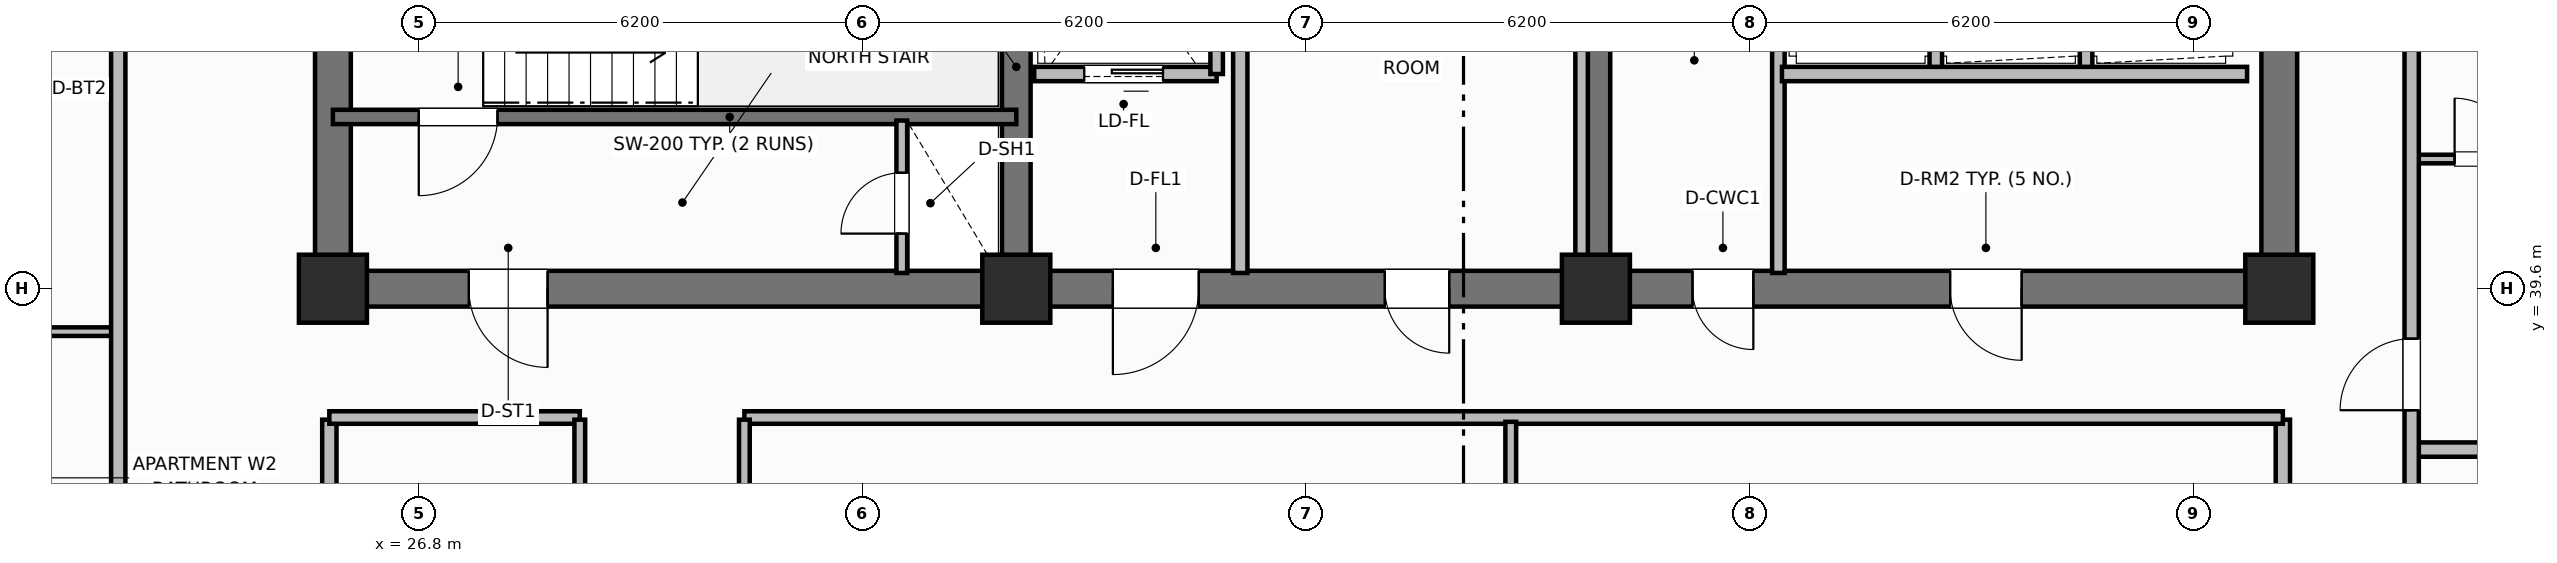
"""IFC4 building model, lengths in metres.
Left out: names, types, materials, properties, quantities, classifications, styles, units other than length and angle.
Written with IfcOpenShell. Run it as: python <this file> out.ifc"""

import sys

from ifc_helpers import new_model, si_unit, direction, frame, frame_2d, origin, origin_2d, place, context, subcontext, project, spatial, rectangle, extrude, element, fill, save


model = new_model("IFC4")
c1 = context("Model", 3, precision=1e-05, world=origin(), true_north=direction((0.0, 1.0)))
c2 = subcontext(c1, "Body", "Model", "MODEL_VIEW")
j1 = project(units=[si_unit("LENGTHUNIT", "METRE"), si_unit("PLANEANGLEUNIT", "RADIAN")], contexts=[c1])
p1 = place(None, origin())
s1 = spatial("IfcSite", under=j1, at=p1, CompositionType="ELEMENT")
p2 = place(p1, origin())
s2 = spatial("IfcBuilding", under=s1, at=p2, CompositionType="ELEMENT")
p3 = place(p2, frame((0.0, 0.0, 177.4)))
s3 = spatial("IfcBuildingStorey", under=s2, at=p3, CompositionType="ELEMENT", Elevation=177.4)
for number, where, z_axis, x_axis in (
    (1, (25.6, 39.85, 0.0), (0.0, 0.0, 1.0), (0.0, 1.0, 0.0)),
    (2, (52.8, 39.85, 0.0), (0.0, 0.0, 1.0), (0.0, 1.0, 0.0)),
):
    element("IfcWall", number, at=place(p3, frame(where, z_axis=z_axis, x_axis=x_axis)), inside=s3, PredefinedType="SHEAR", context=c2, shape_type="SweptSolid", body=[
        extrude(rectangle(XDim=5.7, YDim=0.5, at=frame_2d((2.85, 0.0))), origin(), (0.0, 0.0, 1.0), 3.7),
    ])
p4 = place(p3, frame((52.8, 39.6, 0.0), z_axis=(0.0, 0.0, 1.0), x_axis=(-1.0, 0.0, 0.0)))
e3 = element("IfcWall", 3, at=p4, inside=s3, PredefinedType="SHEAR", context=c2, shape_type="SweptSolid", body=[
    extrude(rectangle(XDim=27.2, YDim=0.5, at=frame_2d((13.6, 0.0))), origin(), (0.0, 0.0, 1.0), 3.7),
])
p5 = place(p4, frame((24.2, 0.0, 0.0)))
e4 = element("IfcOpeningElement", 4, at=p5, cuts=e3, PredefinedType="OPENING", context=c2, shape_type="SweptSolid", body=[
    extrude(rectangle(XDim=1.1, YDim=2.15, at=frame_2d((0.55, 1.075))), frame((0.0, 0.26, 0.0), z_axis=(0.0, -1.0, 0.0), x_axis=(1.0, 0.0, 0.0)), (0.0, 0.0, 1.0), 0.52),
])
p6 = place(p4, frame((15.1, 0.0, 0.0)))
e5 = element("IfcOpeningElement", 5, at=p6, cuts=e3, PredefinedType="OPENING", context=c2, shape_type="SweptSolid", body=[
    extrude(rectangle(XDim=1.2, YDim=2.15, at=frame_2d((0.6, 1.075))), frame((0.0, 0.26, 0.0), z_axis=(0.0, -1.0, 0.0), x_axis=(1.0, 0.0, 0.0)), (0.0, 0.0, 1.0), 0.52),
])
p7 = place(p4, frame((11.6, 0.0, 0.0)))
e6 = element("IfcOpeningElement", 6, at=p7, cuts=e3, PredefinedType="OPENING", context=c2, shape_type="SweptSolid", body=[
    extrude(rectangle(XDim=0.9, YDim=2.1, at=frame_2d((0.45, 1.05))), frame((0.0, 0.26, 0.0), z_axis=(0.0, -1.0, 0.0), x_axis=(1.0, 0.0, 0.0)), (0.0, 0.0, 1.0), 0.52),
])
p8 = place(p4, frame((7.35, 0.0, 0.0)))
e7 = element("IfcOpeningElement", 7, at=p8, cuts=e3, PredefinedType="OPENING", context=c2, shape_type="SweptSolid", body=[
    extrude(rectangle(XDim=0.85, YDim=2.1, at=frame_2d((0.425, 1.05))), frame((0.0, 0.26, 0.0), z_axis=(0.0, -1.0, 0.0), x_axis=(1.0, 0.0, 0.0)), (0.0, 0.0, 1.0), 0.52),
])
p9 = place(p4, frame((3.6, 0.0, 0.0)))
e8 = element("IfcOpeningElement", 8, at=p9, cuts=e3, PredefinedType="OPENING", context=c2, shape_type="SweptSolid", body=[
    extrude(rectangle(XDim=1.0, YDim=2.15, at=frame_2d((0.5, 1.075))), frame((0.0, 0.26, 0.0), z_axis=(0.0, -1.0, 0.0), x_axis=(1.0, 0.0, 0.0)), (0.0, 0.0, 1.0), 0.52),
])
for number, where, z_axis, x_axis in (
    (9, (35.15, 39.85, 0.0), (0.0, 0.0, 1.0), (0.0, 1.0, 0.0)),
    (10, (43.25, 39.85, 0.0), (0.0, 0.0, 1.0), (0.0, 1.0, 0.0)),
):
    element("IfcWall", number, at=place(p3, frame(where, z_axis=z_axis, x_axis=x_axis)), inside=s3, PredefinedType="SHEAR", context=c2, shape_type="SweptSolid", body=[
        extrude(rectangle(XDim=5.7, YDim=0.4, at=frame_2d((2.85, 0.0))), origin(), (0.0, 0.0, 1.0), 3.7),
    ])
for number, where, z_axis, x_axis in (
    (11, (25.6, 39.6, 0.0), (0.0, 0.0, 1.0), (1.0, 0.0, 0.0)),
    (12, (35.15, 39.6, 0.0), (0.0, 0.0, 1.0), (1.0, 0.0, 0.0)),
    (13, (43.25, 39.6, 0.0), (0.0, 0.0, 1.0), (1.0, 0.0, 0.0)),
    (14, (52.8, 39.6, 0.0), (0.0, 0.0, 1.0), (1.0, 0.0, 0.0)),
):
    element("IfcColumn", number, at=place(p3, frame(where, z_axis=z_axis, x_axis=x_axis)), inside=s3, PredefinedType="COLUMN", context=c2, shape_type="SweptSolid", body=[
        extrude(rectangle(XDim=0.95, YDim=0.95, at=origin_2d()), origin(), (0.0, 0.0, 1.0), 3.7),
    ])
p10 = place(p3, frame((35.15, 42.0, 0.0), z_axis=(0.0, 0.0, 1.0), x_axis=(-1.0, 0.0, 0.0)))
e15 = element("IfcWall", 15, at=p10, inside=s3, PredefinedType="SHEAR", context=c2, shape_type="SweptSolid", body=[
    extrude(rectangle(XDim=9.55, YDim=0.2, at=frame_2d((4.775, 0.0))), origin(), (0.0, 0.0, 1.0), 3.7),
])
p11 = place(p10, frame((7.25, 0.0, 0.0)))
e16 = element("IfcOpeningElement", 16, at=p11, cuts=e15, PredefinedType="OPENING", context=c2, shape_type="SweptSolid", body=[
    extrude(rectangle(XDim=1.1, YDim=2.15, at=frame_2d((0.55, 1.075))), frame((0.0, 0.11, 0.0), z_axis=(0.0, -1.0, 0.0), x_axis=(1.0, 0.0, 0.0)), (0.0, 0.0, 1.0), 0.22),
])
p12 = place(p3, frame((33.55, 39.82, 0.0), z_axis=(0.0, 0.0, 1.0), x_axis=(0.0, 1.0, 0.0)))
e17 = element("IfcWall", 17, at=p12, inside=s3, PredefinedType="PARTITIONING", context=c2, shape_type="SweptSolid", body=[
    extrude(rectangle(XDim=2.13, YDim=0.15, at=frame_2d((1.065, 0.0))), origin(), (0.0, 0.0, 1.0), 2.55),
])
p13 = place(p12, frame((0.55, 0.0, 0.0)))
e18 = element("IfcOpeningElement", 18, at=p13, cuts=e17, PredefinedType="OPENING", context=c2, shape_type="SweptSolid", body=[
    extrude(rectangle(XDim=0.85, YDim=2.05, at=frame_2d((0.425, 1.025))), frame((0.0, 0.085, 0.0), z_axis=(0.0, -1.0, 0.0), x_axis=(1.0, 0.0, 0.0)), (0.0, 0.0, 1.0), 0.17),
])
p14 = place(p3, frame((37.95, 42.6, 0.0), z_axis=(0.0, 0.0, 1.0), x_axis=(-1.0, 0.0, 0.0)))
e19 = element("IfcWall", 19, at=p14, inside=s3, PredefinedType="PARTITIONING", context=c2, shape_type="SweptSolid", body=[
    extrude(rectangle(XDim=2.55, YDim=0.2, at=frame_2d((1.275, 0.0))), origin(), (0.0, 0.0, 1.0), 2.32),
])
p15 = place(p14, frame((0.75, 0.0, 0.0)))
e20 = element("IfcOpeningElement", 20, at=p15, cuts=e19, PredefinedType="OPENING", context=c2, shape_type="SweptSolid", body=[
    extrude(rectangle(XDim=1.1, YDim=2.15, at=frame_2d((0.55, 1.075))), frame((0.0, 0.11, 0.0), z_axis=(0.0, -1.0, 0.0), x_axis=(1.0, 0.0, 0.0)), (0.0, 0.0, 1.0), 0.22),
])
p16 = place(p3, frame((37.95, 42.6, 0.0), z_axis=(0.0, 0.0, 1.0), x_axis=(0.0, 1.0, 0.0)))
e21 = element("IfcWall", 21, at=p16, inside=s3, PredefinedType="PARTITIONING", context=c2, shape_type="SweptSolid", body=[
    extrude(rectangle(XDim=2.85, YDim=0.175, at=frame_2d((1.425, 0.0))), origin(), (0.0, 0.0, 1.0), 2.55),
])
p17 = place(p3, frame((38.28, 39.82, 0.0), z_axis=(0.0, 0.0, 1.0), x_axis=(0.0, 1.0, 0.0)))
e22 = element("IfcWall", 22, at=p17, inside=s3, PredefinedType="PARTITIONING", context=c2, shape_type="SweptSolid", body=[
    extrude(rectangle(XDim=5.63, YDim=0.2, at=frame_2d((2.815, 0.0))), origin(), (0.0, 0.0, 1.0), 2.55),
])
for number, where, z_axis, x_axis in (
    (23, (43.05, 39.82, 0.0), (0.0, 0.0, 1.0), (0.0, 1.0, 0.0)),
    (24, (45.8, 39.82, 0.0), (0.0, 0.0, 1.0), (0.0, 1.0, 0.0)),
):
    element("IfcWall", number, at=place(p3, frame(where, z_axis=z_axis, x_axis=x_axis)), inside=s3, PredefinedType="PARTITIONING", context=c2, shape_type="SweptSolid", body=[
        extrude(rectangle(XDim=5.63, YDim=0.175, at=frame_2d((2.815, 0.0))), origin(), (0.0, 0.0, 1.0), 2.55),
    ])
for number, where, z_axis, x_axis in (
    (25, (48.0, 42.65, 0.0), (0.0, 0.0, 1.0), (0.0, 1.0, 0.0)),
    (26, (50.1, 42.65, 0.0), (0.0, 0.0, 1.0), (0.0, 1.0, 0.0)),
):
    element("IfcWall", number, at=place(p3, frame(where, z_axis=z_axis, x_axis=x_axis)), inside=s3, PredefinedType="PARTITIONING", context=c2, shape_type="SweptSolid", body=[
        extrude(rectangle(XDim=2.8, YDim=0.175, at=frame_2d((1.4, 0.0))), origin(), (0.0, 0.0, 1.0), 2.55),
    ])
p18 = place(p3, frame((52.35, 42.6, 0.0), z_axis=(0.0, 0.0, 1.0), x_axis=(-1.0, 0.0, 0.0)))
e27 = element("IfcWall", 27, at=p18, inside=s3, PredefinedType="PARTITIONING", context=c2, shape_type="SweptSolid", body=[
    extrude(rectangle(XDim=6.5, YDim=0.2, at=frame_2d((3.25, 0.0))), origin(), (0.0, 0.0, 1.0), 2.55),
])
for number, where, z_axis, x_axis in (
    (28, (25.55, 18.63, 0.0), (0.0, 0.0, 1.0), (0.0, 1.0, 0.0)),
    (29, (52.85, 18.63, 0.0), (0.0, 0.0, 1.0), (0.0, 1.0, 0.0)),
):
    element("IfcWall", number, at=place(p3, frame(where, z_axis=z_axis, x_axis=x_axis)), inside=s3, PredefinedType="PARTITIONING", context=c2, shape_type="SweptSolid", body=[
        extrude(rectangle(XDim=19.14, YDim=0.2, at=frame_2d((9.57, 0.0))), origin(), (0.0, 0.0, 1.0), 2.55),
    ])
p19 = place(p3, frame((25.55, 37.8, 0.0), z_axis=(0.0, 0.0, 1.0), x_axis=(1.0, 0.0, 0.0)))
e30 = element("IfcWall", 30, at=p19, inside=s3, PredefinedType="PARTITIONING", context=c2, shape_type="SweptSolid", body=[
    extrude(rectangle(XDim=3.5, YDim=0.175, at=frame_2d((1.75, 0.0))), origin(), (0.0, 0.0, 1.0), 2.55),
])
p20 = place(p3, frame((31.35, 37.8, 0.0), z_axis=(0.0, 0.0, 1.0), x_axis=(1.0, 0.0, 0.0)))
e31 = element("IfcWall", 31, at=p20, inside=s3, PredefinedType="PARTITIONING", context=c2, shape_type="SweptSolid", body=[
    extrude(rectangle(XDim=21.5, YDim=0.175, at=frame_2d((10.75, 0.0))), origin(), (0.0, 0.0, 1.0), 2.55),
])
p21 = place(p3, frame((42.06, 18.66, 0.0), z_axis=(0.0, 0.0, 1.0), x_axis=(0.0, 1.0, 0.0)))
e32 = element("IfcWall", 32, at=p21, inside=s3, PredefinedType="PARTITIONING", context=c2, shape_type="SweptSolid", body=[
    extrude(rectangle(XDim=19.08, YDim=0.15, at=frame_2d((9.54, 0.0))), origin(), (0.0, 0.0, 1.0), 2.55),
])
p22 = place(p21, frame((6.5, 0.0, 0.0)))
e33 = element("IfcOpeningElement", 33, at=p22, cuts=e32, PredefinedType="OPENING", context=c2, shape_type="SweptSolid", body=[
    extrude(rectangle(XDim=1.0, YDim=2.15, at=frame_2d((0.5, 1.075))), frame((0.0, 0.085, 0.0), z_axis=(0.0, -1.0, 0.0), x_axis=(1.0, 0.0, 0.0)), (0.0, 0.0, 1.0), 0.17),
])
p23 = place(p3, frame((29.05, 18.63, 0.0), z_axis=(0.0, 0.0, 1.0), x_axis=(0.0, 1.0, 0.0)))
e34 = element("IfcWall", 34, at=p23, inside=s3, PredefinedType="PARTITIONING", context=c2, shape_type="SweptSolid", body=[
    extrude(rectangle(XDim=19.14, YDim=0.15, at=frame_2d((9.57, 0.0))), origin(), (0.0, 0.0, 1.0), 2.55),
])
p24 = place(p23, frame((5.5, 0.0, 0.0)))
e35 = element("IfcOpeningElement", 35, at=p24, cuts=e34, PredefinedType="OPENING", context=c2, shape_type="SweptSolid", body=[
    extrude(rectangle(XDim=1.0, YDim=2.15, at=frame_2d((0.5, 1.075))), frame((0.0, 0.085, 0.0), z_axis=(0.0, -1.0, 0.0), x_axis=(1.0, 0.0, 0.0)), (0.0, 0.0, 1.0), 0.17),
])
p25 = place(p3, frame((31.35, 18.63, 0.0), z_axis=(0.0, 0.0, 1.0), x_axis=(0.0, 1.0, 0.0)))
e36 = element("IfcWall", 36, at=p25, inside=s3, PredefinedType="PARTITIONING", context=c2, shape_type="SweptSolid", body=[
    extrude(rectangle(XDim=19.14, YDim=0.15, at=frame_2d((9.57, 0.0))), origin(), (0.0, 0.0, 1.0), 2.55),
])
p26 = place(p25, frame((5.5, 0.0, 0.0)))
e37 = element("IfcOpeningElement", 37, at=p26, cuts=e36, PredefinedType="OPENING", context=c2, shape_type="SweptSolid", body=[
    extrude(rectangle(XDim=1.0, YDim=2.15, at=frame_2d((0.5, 1.075))), frame((0.0, 0.085, 0.0), z_axis=(0.0, -1.0, 0.0), x_axis=(1.0, 0.0, 0.0)), (0.0, 0.0, 1.0), 0.17),
])
p27 = place(p3, frame((20.35, 39.0, 0.0), z_axis=(0.0, 0.0, 1.0), x_axis=(1.0, 0.0, 0.0)))
e38 = element("IfcWall", 38, at=p27, inside=s3, PredefinedType="PARTITIONING", context=c2, shape_type="SweptSolid", body=[
    extrude(rectangle(XDim=2.25, YDim=0.12, at=frame_2d((1.125, 0.0))), origin(), (0.0, 0.0, 1.0), 2.55),
])
p28 = place(p3, frame((22.6, 10.6, 0.0), z_axis=(0.0, 0.0, 1.0), x_axis=(0.0, 1.0, 0.0)))
e39 = element("IfcWall", 39, at=p28, inside=s3, PredefinedType="PARTITIONING", context=c2, shape_type="SweptSolid", body=[
    extrude(rectangle(XDim=35.2, YDim=0.2, at=frame_2d((17.6, 0.0))), origin(), (0.0, 0.0, 1.0), 2.55),
])
p29 = place(p28, frame((2.65, 0.0, 0.0)))
e40 = element("IfcOpeningElement", 40, at=p29, cuts=e39, PredefinedType="OPENING", context=c2, shape_type="SweptSolid", body=[
    extrude(rectangle(XDim=1.0, YDim=2.15, at=frame_2d((0.5, 1.075))), frame((0.0, 0.11, 0.0), z_axis=(0.0, -1.0, 0.0), x_axis=(1.0, 0.0, 0.0)), (0.0, 0.0, 1.0), 0.22),
])
p30 = place(p28, frame((22.75, 0.0, 0.0)))
e41 = element("IfcOpeningElement", 41, at=p30, cuts=e39, PredefinedType="OPENING", context=c2, shape_type="SweptSolid", body=[
    extrude(rectangle(XDim=1.0, YDim=2.15, at=frame_2d((0.5, 1.075))), frame((0.0, 0.11, 0.0), z_axis=(0.0, -1.0, 0.0), x_axis=(1.0, 0.0, 0.0)), (0.0, 0.0, 1.0), 0.22),
])
p31 = place(p3, frame((54.65, 37.352, 0.0), z_axis=(0.0, 0.0, 1.0), x_axis=(1.0, 0.0, 0.0)))
e42 = element("IfcWall", 42, at=p31, inside=s3, PredefinedType="PARTITIONING", context=c2, shape_type="SweptSolid", body=[
    extrude(rectangle(XDim=7.18, YDim=0.2, at=frame_2d((3.59, 0.0))), origin(), (0.0, 0.0, 1.0), 2.55),
])
p32 = place(p3, frame((54.65, 41.412, 0.0), z_axis=(0.0, 0.0, 1.0), x_axis=(1.0, 0.0, 0.0)))
e43 = element("IfcWall", 43, at=p32, inside=s3, PredefinedType="PARTITIONING", context=c2, shape_type="SweptSolid", body=[
    extrude(rectangle(XDim=2.25, YDim=0.12, at=frame_2d((1.125, 0.0))), origin(), (0.0, 0.0, 1.0), 2.55),
])
p33 = place(p32, frame((0.6, 0.0, 0.0)))
e44 = element("IfcOpeningElement", 44, at=p33, cuts=e43, PredefinedType="OPENING", context=c2, shape_type="SweptSolid", body=[
    extrude(rectangle(XDim=0.85, YDim=2.1, at=frame_2d((0.425, 1.05))), frame((0.0, 0.07, 0.0), z_axis=(0.0, -1.0, 0.0), x_axis=(1.0, 0.0, 0.0)), (0.0, 0.0, 1.0), 0.14),
])
p34 = place(p3, frame((54.65, 10.6, 0.0), z_axis=(0.0, 0.0, 1.0), x_axis=(0.0, 1.0, 0.0)))
e45 = element("IfcWall", 45, at=p34, inside=s3, PredefinedType="PARTITIONING", context=c2, shape_type="SweptSolid", body=[
    extrude(rectangle(XDim=35.2, YDim=0.2, at=frame_2d((17.6, 0.0))), origin(), (0.0, 0.0, 1.0), 2.55),
])
p35 = place(p34, frame((2.65, 0.0, 0.0)))
e46 = element("IfcOpeningElement", 46, at=p35, cuts=e45, PredefinedType="OPENING", context=c2, shape_type="SweptSolid", body=[
    extrude(rectangle(XDim=1.0, YDim=2.15, at=frame_2d((0.5, 1.075))), frame((0.0, 0.11, 0.0), z_axis=(0.0, -1.0, 0.0), x_axis=(1.0, 0.0, 0.0)), (0.0, 0.0, 1.0), 0.22),
])
p36 = place(p34, frame((11.352, 0.0, 0.0)))
e47 = element("IfcOpeningElement", 47, at=p36, cuts=e45, PredefinedType="OPENING", context=c2, shape_type="SweptSolid", body=[
    extrude(rectangle(XDim=1.0, YDim=2.15, at=frame_2d((0.5, 1.075))), frame((0.0, 0.11, 0.0), z_axis=(0.0, -1.0, 0.0), x_axis=(1.0, 0.0, 0.0)), (0.0, 0.0, 1.0), 0.22),
])
p37 = place(p34, frame((21.37, 0.0, 0.0)))
e48 = element("IfcOpeningElement", 48, at=p37, cuts=e45, PredefinedType="OPENING", context=c2, shape_type="SweptSolid", body=[
    extrude(rectangle(XDim=1.0, YDim=2.15, at=frame_2d((0.5, 1.075))), frame((0.0, 0.11, 0.0), z_axis=(0.0, -1.0, 0.0), x_axis=(1.0, 0.0, 0.0)), (0.0, 0.0, 1.0), 0.22),
])
p38 = place(p34, frame((27.302, 0.0, 0.0)))
e49 = element("IfcOpeningElement", 49, at=p38, cuts=e45, PredefinedType="OPENING", context=c2, shape_type="SweptSolid", body=[
    extrude(rectangle(XDim=1.0, YDim=2.15, at=frame_2d((0.5, 1.075))), frame((0.0, 0.11, 0.0), z_axis=(0.0, -1.0, 0.0), x_axis=(1.0, 0.0, 0.0)), (0.0, 0.0, 1.0), 0.22),
])
p39 = place(p11, origin())
e50 = element("IfcDoor", 50, at=p39, inside=s3, OperationType="SINGLE_SWING_RIGHT", PredefinedType="DOOR", context=c2, shape_type="SweptSolid", body=[
    extrude(rectangle(XDim=1.1, YDim=2.15, at=frame_2d((0.55, 1.075))), frame((0.0, 0.025, 0.0), z_axis=(0.0, -1.0, 0.0), x_axis=(1.0, 0.0, 0.0)), (0.0, 0.0, 1.0), 0.05),
])
fill(e16, e50)
p40 = place(p13, origin())
e51 = element("IfcDoor", 51, at=p40, inside=s3, OperationType="SINGLE_SWING_LEFT", PredefinedType="TRAPDOOR", context=c2, shape_type="SweptSolid", body=[
    extrude(rectangle(XDim=0.85, YDim=2.05, at=frame_2d((0.425, 1.025))), frame((0.0, 0.025, 0.0), z_axis=(0.0, -1.0, 0.0), x_axis=(1.0, 0.0, 0.0)), (0.0, 0.0, 1.0), 0.05),
])
fill(e18, e51)
p41 = place(p15, origin())
e52 = element("IfcDoor", 52, at=p41, inside=s3, OperationType="SLIDING_TO_LEFT", PredefinedType="DOOR", context=c2, shape_type="SweptSolid", body=[
    extrude(rectangle(XDim=1.1, YDim=2.15, at=frame_2d((0.55, 1.075))), frame((0.0, 0.025, 0.0), z_axis=(0.0, -1.0, 0.0), x_axis=(1.0, 0.0, 0.0)), (0.0, 0.0, 1.0), 0.05),
])
fill(e20, e52)
p42 = place(p33, origin())
e53 = element("IfcDoor", 53, at=p42, inside=s3, OperationType="SINGLE_SWING_LEFT", PredefinedType="DOOR", context=c2, shape_type="SweptSolid", body=[
    extrude(rectangle(XDim=0.85, YDim=2.1, at=frame_2d((0.425, 1.05))), frame((0.0, 0.025, 0.0), z_axis=(0.0, -1.0, 0.0), x_axis=(1.0, 0.0, 0.0)), (0.0, 0.0, 1.0), 0.05),
])
fill(e44, e53)
p43 = place(p38, origin())
e54 = element("IfcDoor", 54, at=p43, inside=s3, OperationType="SINGLE_SWING_LEFT", PredefinedType="DOOR", context=c2, shape_type="SweptSolid", body=[
    extrude(rectangle(XDim=1.0, YDim=2.15, at=frame_2d((0.5, 1.075))), frame((0.0, 0.025, 0.0), z_axis=(0.0, -1.0, 0.0), x_axis=(1.0, 0.0, 0.0)), (0.0, 0.0, 1.0), 0.05),
])
fill(e49, e54)
p44 = place(p5, origin())
e55 = element("IfcDoor", 55, at=p44, inside=s3, OperationType="SINGLE_SWING_LEFT", PredefinedType="DOOR", context=c2, shape_type="SweptSolid", body=[
    extrude(rectangle(XDim=1.1, YDim=2.15, at=frame_2d((0.55, 1.075))), frame((0.0, 0.025, 0.0), z_axis=(0.0, -1.0, 0.0), x_axis=(1.0, 0.0, 0.0)), (0.0, 0.0, 1.0), 0.05),
])
fill(e4, e55)
p45 = place(p6, origin())
e56 = element("IfcDoor", 56, at=p45, inside=s3, OperationType="SINGLE_SWING_RIGHT", PredefinedType="DOOR", context=c2, shape_type="SweptSolid", body=[
    extrude(rectangle(XDim=1.2, YDim=2.15, at=frame_2d((0.6, 1.075))), frame((0.0, 0.025, 0.0), z_axis=(0.0, -1.0, 0.0), x_axis=(1.0, 0.0, 0.0)), (0.0, 0.0, 1.0), 0.05),
])
fill(e5, e56)
p46 = place(p7, origin())
e57 = element("IfcDoor", 57, at=p46, inside=s3, OperationType="SINGLE_SWING_LEFT", PredefinedType="DOOR", context=c2, shape_type="SweptSolid", body=[
    extrude(rectangle(XDim=0.9, YDim=2.1, at=frame_2d((0.45, 1.05))), frame((0.0, 0.025, 0.0), z_axis=(0.0, -1.0, 0.0), x_axis=(1.0, 0.0, 0.0)), (0.0, 0.0, 1.0), 0.05),
])
fill(e6, e57)
p47 = place(p8, origin())
e58 = element("IfcDoor", 58, at=p47, inside=s3, OperationType="SINGLE_SWING_LEFT", PredefinedType="DOOR", context=c2, shape_type="SweptSolid", body=[
    extrude(rectangle(XDim=0.85, YDim=2.1, at=frame_2d((0.425, 1.05))), frame((0.0, 0.025, 0.0), z_axis=(0.0, -1.0, 0.0), x_axis=(1.0, 0.0, 0.0)), (0.0, 0.0, 1.0), 0.05),
])
fill(e7, e58)
p48 = place(p9, origin())
e59 = element("IfcDoor", 59, at=p48, inside=s3, OperationType="SINGLE_SWING_LEFT", PredefinedType="DOOR", context=c2, shape_type="SweptSolid", body=[
    extrude(rectangle(XDim=1.0, YDim=2.15, at=frame_2d((0.5, 1.075))), frame((0.0, 0.025, 0.0), z_axis=(0.0, -1.0, 0.0), x_axis=(1.0, 0.0, 0.0)), (0.0, 0.0, 1.0), 0.05),
])
fill(e8, e59)
save(model, sys.argv[1])
